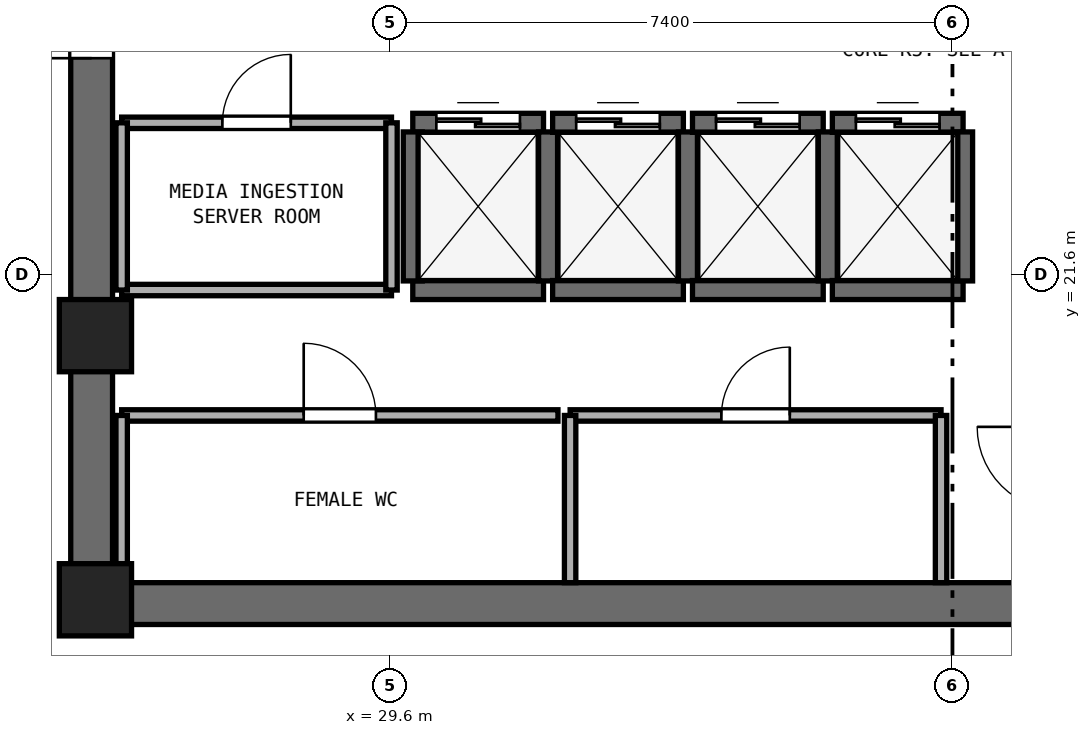
"""IFC4 building model, lengths in metres.
Left out: names, types, materials, properties, quantities, classifications, styles, units other than length and angle.
Written with IfcOpenShell. Run it as: python <this file> out.ifc"""

import sys

from ifc_helpers import new_model, si_unit, direction, frame, frame_2d, origin, origin_2d, place, context, subcontext, project, spatial, rectangle, extrude, element, fill, save


model = new_model("IFC4")
c1 = context("Model", 3, precision=1e-05, world=origin(), true_north=direction((0.0, 1.0)))
c2 = subcontext(c1, "Body", "Model", "MODEL_VIEW")
j1 = project(units=[si_unit("LENGTHUNIT", "METRE"), si_unit("PLANEANGLEUNIT", "RADIAN")], contexts=[c1])
p1 = place(None, origin())
s1 = spatial("IfcSite", under=j1, at=p1, CompositionType="ELEMENT")
p2 = place(p1, origin())
s2 = spatial("IfcBuilding", under=s1, at=p2, CompositionType="ELEMENT")
p3 = place(p2, frame((0.0, 0.0, 182.0)))
s3 = spatial("IfcBuildingStorey", under=s2, at=p3, CompositionType="ELEMENT", Elevation=182.0)
p4 = place(p3, frame((25.4, 17.275, 0.0), z_axis=(0.0, 0.0, 1.0), x_axis=(1.0, 0.0, 0.0)))
e1 = element("IfcWall", 1, at=p4, inside=s3, PredefinedType="SHEAR", context=c2, shape_type="SweptSolid", body=[
    extrude(rectangle(XDim=23.2, YDim=0.55, at=frame_2d((11.6, 0.0))), origin(), (0.0, 0.0, 1.0), 3.54),
])
p5 = place(p3, frame((25.675, 17.55, 0.0), z_axis=(0.0, 0.0, 1.0), x_axis=(0.0, 1.0, 0.0)))
e2 = element("IfcWall", 2, at=p5, inside=s3, PredefinedType="SHEAR", context=c2, shape_type="SweptSolid", body=[
    extrude(rectangle(XDim=15.3, YDim=0.55, at=frame_2d((7.65, 0.0))), origin(), (0.0, 0.0, 1.0), 3.54),
])
p6 = place(p5, frame((6.9, 0.0, 0.0)))
e3 = element("IfcOpeningElement", 3, at=p6, cuts=e2, PredefinedType="OPENING", context=c2, shape_type="SweptSolid", body=[
    extrude(rectangle(XDim=1.5, YDim=2.15, at=frame_2d((0.75, 1.075))), frame((0.0, 0.285, 0.0), z_axis=(0.0, -1.0, 0.0), x_axis=(1.0, 0.0, 0.0)), (0.0, 0.0, 1.0), 0.57),
])
for number, where, z_axis, x_axis in (
    (4, (25.725, 17.325, 0.0), (0.0, 0.0, 1.0), (1.0, 0.0, 0.0)),
    (5, (25.725, 20.8, 0.0), (0.0, 0.0, 1.0), (1.0, 0.0, 0.0)),
):
    element("IfcColumn", number, at=place(p3, frame(where, z_axis=z_axis, x_axis=x_axis)), inside=s3, PredefinedType="PILASTER", context=c2, shape_type="SweptSolid", body=[
        extrude(rectangle(XDim=0.95, YDim=0.95, at=origin_2d()), origin(), (0.0, 0.0, 1.0), 3.8),
    ])
p7 = place(p3, frame((29.9, 21.4, 0.0), z_axis=(0.0, 0.0, 1.0), x_axis=(1.0, 0.0, 0.0)))
e6 = element("IfcWall", 6, at=p7, inside=s3, PredefinedType="SHEAR", context=c2, shape_type="SweptSolid", body=[
    extrude(rectangle(XDim=1.72, YDim=0.25, at=frame_2d((0.86, 0.0))), origin(), (0.0, 0.0, 1.0), 3.54),
])
p8 = place(p3, frame((29.9, 23.6, 0.0), z_axis=(0.0, 0.0, 1.0), x_axis=(1.0, 0.0, 0.0)))
e7 = element("IfcWall", 7, at=p8, inside=s3, PredefinedType="SHEAR", context=c2, shape_type="SweptSolid", body=[
    extrude(rectangle(XDim=1.72, YDim=0.25, at=frame_2d((0.86, 0.0))), origin(), (0.0, 0.0, 1.0), 3.54),
])
p9 = place(p8, frame((0.31, 0.0, 0.0)))
e8 = element("IfcOpeningElement", 8, at=p9, cuts=e7, PredefinedType="OPENING", context=c2, shape_type="SweptSolid", body=[
    extrude(rectangle(XDim=1.1, YDim=2.15, at=frame_2d((0.55, 1.075))), frame((0.0, 0.135, 0.0), z_axis=(0.0, -1.0, 0.0), x_axis=(1.0, 0.0, 0.0)), (0.0, 0.0, 1.0), 0.27),
])
for number, where, z_axis, x_axis in (
    (9, (29.9, 21.52, 0.0), (0.0, 0.0, 1.0), (0.0, 1.0, 0.0)),
    (10, (31.68, 21.52, 0.0), (0.0, 0.0, 1.0), (0.0, 1.0, 0.0)),
):
    element("IfcWall", number, at=place(p3, frame(where, z_axis=z_axis, x_axis=x_axis)), inside=s3, PredefinedType="SHEAR", context=c2, shape_type="SweptSolid", body=[
        extrude(rectangle(XDim=1.96, YDim=0.25, at=frame_2d((0.98, 0.0))), origin(), (0.0, 0.0, 1.0), 3.54),
    ])
p10 = place(p3, frame((31.74, 21.4, 0.0), z_axis=(0.0, 0.0, 1.0), x_axis=(1.0, 0.0, 0.0)))
e11 = element("IfcWall", 11, at=p10, inside=s3, PredefinedType="SHEAR", context=c2, shape_type="SweptSolid", body=[
    extrude(rectangle(XDim=1.72, YDim=0.25, at=frame_2d((0.86, 0.0))), origin(), (0.0, 0.0, 1.0), 3.54),
])
p11 = place(p3, frame((31.74, 23.6, 0.0), z_axis=(0.0, 0.0, 1.0), x_axis=(1.0, 0.0, 0.0)))
e12 = element("IfcWall", 12, at=p11, inside=s3, PredefinedType="SHEAR", context=c2, shape_type="SweptSolid", body=[
    extrude(rectangle(XDim=1.72, YDim=0.25, at=frame_2d((0.86, 0.0))), origin(), (0.0, 0.0, 1.0), 3.54),
])
p12 = place(p11, frame((0.31, 0.0, 0.0)))
e13 = element("IfcOpeningElement", 13, at=p12, cuts=e12, PredefinedType="OPENING", context=c2, shape_type="SweptSolid", body=[
    extrude(rectangle(XDim=1.1, YDim=2.15, at=frame_2d((0.55, 1.075))), frame((0.0, 0.135, 0.0), z_axis=(0.0, -1.0, 0.0), x_axis=(1.0, 0.0, 0.0)), (0.0, 0.0, 1.0), 0.27),
])
p13 = place(p3, frame((33.52, 21.52, 0.0), z_axis=(0.0, 0.0, 1.0), x_axis=(0.0, 1.0, 0.0)))
e14 = element("IfcWall", 14, at=p13, inside=s3, PredefinedType="SHEAR", context=c2, shape_type="SweptSolid", body=[
    extrude(rectangle(XDim=1.96, YDim=0.25, at=frame_2d((0.98, 0.0))), origin(), (0.0, 0.0, 1.0), 3.54),
])
p14 = place(p3, frame((33.58, 21.4, 0.0), z_axis=(0.0, 0.0, 1.0), x_axis=(1.0, 0.0, 0.0)))
e15 = element("IfcWall", 15, at=p14, inside=s3, PredefinedType="SHEAR", context=c2, shape_type="SweptSolid", body=[
    extrude(rectangle(XDim=1.72, YDim=0.25, at=frame_2d((0.86, 0.0))), origin(), (0.0, 0.0, 1.0), 3.54),
])
p15 = place(p3, frame((33.58, 23.6, 0.0), z_axis=(0.0, 0.0, 1.0), x_axis=(1.0, 0.0, 0.0)))
e16 = element("IfcWall", 16, at=p15, inside=s3, PredefinedType="SHEAR", context=c2, shape_type="SweptSolid", body=[
    extrude(rectangle(XDim=1.72, YDim=0.25, at=frame_2d((0.86, 0.0))), origin(), (0.0, 0.0, 1.0), 3.54),
])
p16 = place(p15, frame((0.31, 0.0, 0.0)))
e17 = element("IfcOpeningElement", 17, at=p16, cuts=e16, PredefinedType="OPENING", context=c2, shape_type="SweptSolid", body=[
    extrude(rectangle(XDim=1.1, YDim=2.15, at=frame_2d((0.55, 1.075))), frame((0.0, 0.135, 0.0), z_axis=(0.0, -1.0, 0.0), x_axis=(1.0, 0.0, 0.0)), (0.0, 0.0, 1.0), 0.27),
])
p17 = place(p3, frame((35.36, 21.52, 0.0), z_axis=(0.0, 0.0, 1.0), x_axis=(0.0, 1.0, 0.0)))
e18 = element("IfcWall", 18, at=p17, inside=s3, PredefinedType="SHEAR", context=c2, shape_type="SweptSolid", body=[
    extrude(rectangle(XDim=1.96, YDim=0.25, at=frame_2d((0.98, 0.0))), origin(), (0.0, 0.0, 1.0), 3.54),
])
p18 = place(p3, frame((35.42, 21.4, 0.0), z_axis=(0.0, 0.0, 1.0), x_axis=(1.0, 0.0, 0.0)))
e19 = element("IfcWall", 19, at=p18, inside=s3, PredefinedType="SHEAR", context=c2, shape_type="SweptSolid", body=[
    extrude(rectangle(XDim=1.72, YDim=0.25, at=frame_2d((0.86, 0.0))), origin(), (0.0, 0.0, 1.0), 3.54),
])
p19 = place(p3, frame((35.42, 23.6, 0.0), z_axis=(0.0, 0.0, 1.0), x_axis=(1.0, 0.0, 0.0)))
e20 = element("IfcWall", 20, at=p19, inside=s3, PredefinedType="SHEAR", context=c2, shape_type="SweptSolid", body=[
    extrude(rectangle(XDim=1.72, YDim=0.25, at=frame_2d((0.86, 0.0))), origin(), (0.0, 0.0, 1.0), 3.54),
])
p20 = place(p19, frame((0.31, 0.0, 0.0)))
e21 = element("IfcOpeningElement", 21, at=p20, cuts=e20, PredefinedType="OPENING", context=c2, shape_type="SweptSolid", body=[
    extrude(rectangle(XDim=1.1, YDim=2.15, at=frame_2d((0.55, 1.075))), frame((0.0, 0.135, 0.0), z_axis=(0.0, -1.0, 0.0), x_axis=(1.0, 0.0, 0.0)), (0.0, 0.0, 1.0), 0.27),
])
p21 = place(p3, frame((37.14, 21.52, 0.0), z_axis=(0.0, 0.0, 1.0), x_axis=(0.0, 1.0, 0.0)))
e22 = element("IfcWall", 22, at=p21, inside=s3, PredefinedType="SHEAR", context=c2, shape_type="SweptSolid", body=[
    extrude(rectangle(XDim=1.96, YDim=0.25, at=frame_2d((0.98, 0.0))), origin(), (0.0, 0.0, 1.0), 3.54),
])
p22 = place(p3, frame((26.07, 19.75, 0.0), z_axis=(0.0, 0.0, 1.0), x_axis=(1.0, 0.0, 0.0)))
e23 = element("IfcWall", 23, at=p22, inside=s3, PredefinedType="PARTITIONING", context=c2, shape_type="SweptSolid", body=[
    extrude(rectangle(XDim=5.74, YDim=0.15, at=frame_2d((2.87, 0.0))), origin(), (0.0, 0.0, 1.0), 3.54),
])
p23 = place(p22, frame((2.395, 0.0, 0.0)))
e24 = element("IfcOpeningElement", 24, at=p23, cuts=e23, PredefinedType="OPENING", context=c2, shape_type="SweptSolid", body=[
    extrude(rectangle(XDim=0.95, YDim=2.1, at=frame_2d((0.475, 1.05))), frame((0.0, 0.085, 0.0), z_axis=(0.0, -1.0, 0.0), x_axis=(1.0, 0.0, 0.0)), (0.0, 0.0, 1.0), 0.17),
])
p24 = place(p3, frame((26.07, 17.55, 0.0), z_axis=(0.0, 0.0, 1.0), x_axis=(0.0, 1.0, 0.0)))
e25 = element("IfcWall", 25, at=p24, inside=s3, PredefinedType="PARTITIONING", context=c2, shape_type="SweptSolid", body=[
    extrude(rectangle(XDim=2.2, YDim=0.15, at=frame_2d((1.1, 0.0))), origin(), (0.0, 0.0, 1.0), 2.64),
])
p25 = place(p3, frame((31.97, 19.75, 0.0), z_axis=(0.0, 0.0, 1.0), x_axis=(1.0, 0.0, 0.0)))
e26 = element("IfcWall", 26, at=p25, inside=s3, PredefinedType="PARTITIONING", context=c2, shape_type="SweptSolid", body=[
    extrude(rectangle(XDim=4.88, YDim=0.15, at=frame_2d((2.44, 0.0))), origin(), (0.0, 0.0, 1.0), 3.54),
])
p26 = place(p25, frame((1.99, 0.0, 0.0)))
e27 = element("IfcOpeningElement", 27, at=p26, cuts=e26, PredefinedType="OPENING", context=c2, shape_type="SweptSolid", body=[
    extrude(rectangle(XDim=0.9, YDim=2.1, at=frame_2d((0.45, 1.05))), frame((0.0, 0.085, 0.0), z_axis=(0.0, -1.0, 0.0), x_axis=(1.0, 0.0, 0.0)), (0.0, 0.0, 1.0), 0.17),
])
for number, where, z_axis, x_axis in (
    (28, (31.97, 17.55, 0.0), (0.0, 0.0, 1.0), (0.0, 1.0, 0.0)),
    (29, (36.85, 17.55, 0.0), (0.0, 0.0, 1.0), (0.0, 1.0, 0.0)),
):
    element("IfcWall", number, at=place(p3, frame(where, z_axis=z_axis, x_axis=x_axis)), inside=s3, PredefinedType="PARTITIONING", context=c2, shape_type="SweptSolid", body=[
        extrude(rectangle(XDim=2.2, YDim=0.15, at=frame_2d((1.1, 0.0))), origin(), (0.0, 0.0, 1.0), 3.54),
    ])
p27 = place(p3, frame((26.07, 21.4, 0.0), z_axis=(0.0, 0.0, 1.0), x_axis=(1.0, 0.0, 0.0)))
e30 = element("IfcWall", 30, at=p27, inside=s3, PredefinedType="PARTITIONING", context=c2, shape_type="SweptSolid", body=[
    extrude(rectangle(XDim=3.55, YDim=0.15, at=frame_2d((1.775, 0.0))), origin(), (0.0, 0.0, 1.0), 3.54),
])
p28 = place(p3, frame((26.07, 23.6, 0.0), z_axis=(0.0, 0.0, 1.0), x_axis=(1.0, 0.0, 0.0)))
e31 = element("IfcWall", 31, at=p28, inside=s3, PredefinedType="PARTITIONING", context=c2, shape_type="SweptSolid", body=[
    extrude(rectangle(XDim=3.55, YDim=0.15, at=frame_2d((1.775, 0.0))), origin(), (0.0, 0.0, 1.0), 3.54),
])
p29 = place(p28, frame((1.325, 0.0, 0.0)))
e32 = element("IfcOpeningElement", 32, at=p29, cuts=e31, PredefinedType="OPENING", context=c2, shape_type="SweptSolid", body=[
    extrude(rectangle(XDim=0.9, YDim=2.1, at=frame_2d((0.45, 1.05))), frame((0.0, 0.085, 0.0), z_axis=(0.0, -1.0, 0.0), x_axis=(1.0, 0.0, 0.0)), (0.0, 0.0, 1.0), 0.17),
])
p30 = place(p3, frame((26.07, 21.4, 0.0), z_axis=(0.0, 0.0, 1.0), x_axis=(0.0, 1.0, 0.0)))
e33 = element("IfcWall", 33, at=p30, inside=s3, PredefinedType="PARTITIONING", context=c2, shape_type="SweptSolid", body=[
    extrude(rectangle(XDim=2.2, YDim=0.15, at=frame_2d((1.1, 0.0))), origin(), (0.0, 0.0, 1.0), 2.64),
])
p31 = place(p3, frame((29.62, 21.4, 0.0), z_axis=(0.0, 0.0, 1.0), x_axis=(0.0, 1.0, 0.0)))
e34 = element("IfcWall", 34, at=p31, inside=s3, PredefinedType="PARTITIONING", context=c2, shape_type="SweptSolid", body=[
    extrude(rectangle(XDim=2.2, YDim=0.15, at=frame_2d((1.1, 0.0))), origin(), (0.0, 0.0, 1.0), 3.54),
])
p32 = place(p9, origin())
e35 = element("IfcDoor", 35, at=p32, inside=s3, OperationType="DOUBLE_DOOR_SLIDING", PredefinedType="DOOR", context=c2, shape_type="SweptSolid", body=[
    extrude(rectangle(XDim=1.1, YDim=2.15, at=frame_2d((0.55, 1.075))), frame((0.0, 0.025, 0.0), z_axis=(0.0, -1.0, 0.0), x_axis=(1.0, 0.0, 0.0)), (0.0, 0.0, 1.0), 0.05),
])
fill(e8, e35)
p33 = place(p12, origin())
e36 = element("IfcDoor", 36, at=p33, inside=s3, OperationType="DOUBLE_DOOR_SLIDING", PredefinedType="DOOR", context=c2, shape_type="SweptSolid", body=[
    extrude(rectangle(XDim=1.1, YDim=2.15, at=frame_2d((0.55, 1.075))), frame((0.0, 0.025, 0.0), z_axis=(0.0, -1.0, 0.0), x_axis=(1.0, 0.0, 0.0)), (0.0, 0.0, 1.0), 0.05),
])
fill(e13, e36)
p34 = place(p16, origin())
e37 = element("IfcDoor", 37, at=p34, inside=s3, OperationType="DOUBLE_DOOR_SLIDING", PredefinedType="DOOR", context=c2, shape_type="SweptSolid", body=[
    extrude(rectangle(XDim=1.1, YDim=2.15, at=frame_2d((0.55, 1.075))), frame((0.0, 0.025, 0.0), z_axis=(0.0, -1.0, 0.0), x_axis=(1.0, 0.0, 0.0)), (0.0, 0.0, 1.0), 0.05),
])
fill(e17, e37)
p35 = place(p20, origin())
e38 = element("IfcDoor", 38, at=p35, inside=s3, OperationType="DOUBLE_DOOR_SLIDING", PredefinedType="DOOR", context=c2, shape_type="SweptSolid", body=[
    extrude(rectangle(XDim=1.1, YDim=2.15, at=frame_2d((0.55, 1.075))), frame((0.0, 0.025, 0.0), z_axis=(0.0, -1.0, 0.0), x_axis=(1.0, 0.0, 0.0)), (0.0, 0.0, 1.0), 0.05),
])
fill(e21, e38)
p36 = place(p6, origin())
e39 = element("IfcDoor", 39, at=p36, inside=s3, OperationType="DOUBLE_DOOR_SINGLE_SWING", PredefinedType="DOOR", context=c2, shape_type="SweptSolid", body=[
    extrude(rectangle(XDim=1.5, YDim=2.15, at=frame_2d((0.75, 1.075))), frame((0.0, 0.025, 0.0), z_axis=(0.0, -1.0, 0.0), x_axis=(1.0, 0.0, 0.0)), (0.0, 0.0, 1.0), 0.05),
])
fill(e3, e39)
p37 = place(p23, origin())
e40 = element("IfcDoor", 40, at=p37, inside=s3, OperationType="SINGLE_SWING_LEFT", PredefinedType="DOOR", context=c2, shape_type="SweptSolid", body=[
    extrude(rectangle(XDim=0.95, YDim=2.1, at=frame_2d((0.475, 1.05))), frame((0.0, 0.025, 0.0), z_axis=(0.0, -1.0, 0.0), x_axis=(1.0, 0.0, 0.0)), (0.0, 0.0, 1.0), 0.05),
])
fill(e24, e40)
p38 = place(p26, origin())
e41 = element("IfcDoor", 41, at=p38, inside=s3, OperationType="SINGLE_SWING_RIGHT", PredefinedType="DOOR", context=c2, shape_type="SweptSolid", body=[
    extrude(rectangle(XDim=0.9, YDim=2.1, at=frame_2d((0.45, 1.05))), frame((0.0, 0.025, 0.0), z_axis=(0.0, -1.0, 0.0), x_axis=(1.0, 0.0, 0.0)), (0.0, 0.0, 1.0), 0.05),
])
fill(e27, e41)
p39 = place(p29, origin())
e42 = element("IfcDoor", 42, at=p39, inside=s3, OperationType="SINGLE_SWING_RIGHT", PredefinedType="DOOR", context=c2, shape_type="SweptSolid", body=[
    extrude(rectangle(XDim=0.9, YDim=2.1, at=frame_2d((0.45, 1.05))), frame((0.0, 0.025, 0.0), z_axis=(0.0, -1.0, 0.0), x_axis=(1.0, 0.0, 0.0)), (0.0, 0.0, 1.0), 0.05),
])
fill(e32, e42)
save(model, sys.argv[1])
